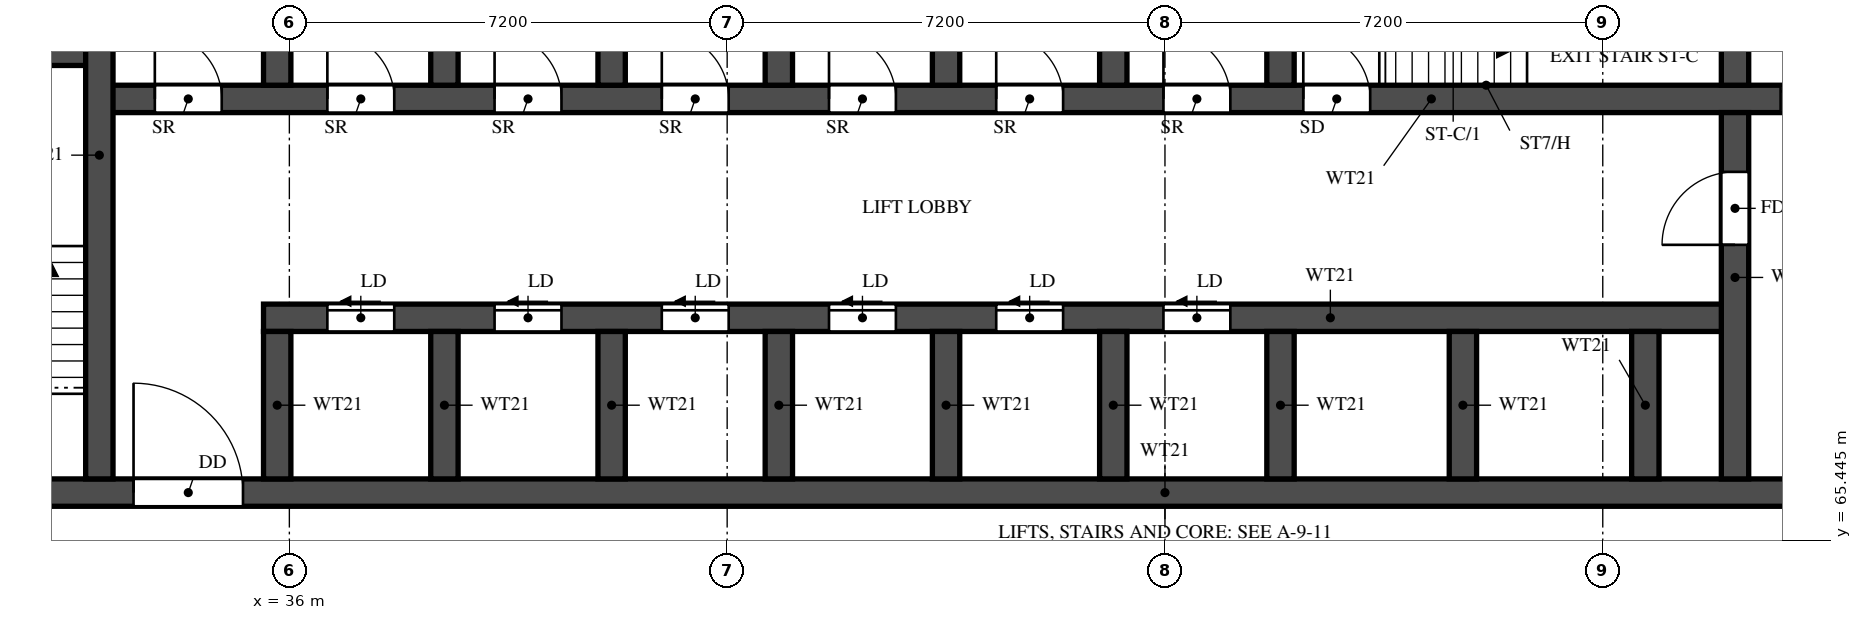
"""IFC4 building model, lengths in metres.
Left out: names, types, materials, properties, quantities, classifications, styles, units other than length and angle.
Written with IfcOpenShell. Run it as: python <this file> out.ifc"""

import sys

from ifc_helpers import new_model, si_unit, direction, frame, frame_2d, origin, place, context, subcontext, project, spatial, rectangle, extrude, element, fill, save


model = new_model("IFC4")
c1 = context("Model", 3, precision=1e-05, world=origin(), true_north=direction((0.0, 1.0)))
c2 = subcontext(c1, "Body", "Model", "MODEL_VIEW")
j1 = project(units=[si_unit("LENGTHUNIT", "METRE"), si_unit("PLANEANGLEUNIT", "RADIAN")], contexts=[c1])
p1 = place(None, origin())
s1 = spatial("IfcSite", under=j1, at=p1, CompositionType="ELEMENT")
p2 = place(p1, origin())
s2 = spatial("IfcBuilding", under=s1, at=p2, CompositionType="ELEMENT")
p3 = place(p2, frame((0.0, 0.0, 65.5)))
s3 = spatial("IfcBuildingStorey", under=s2, at=p3, CompositionType="ELEMENT", Elevation=65.5)
p4 = place(p3, frame((29.7, 66.225, 0.0), z_axis=(0.0, 0.0, 1.0), x_axis=(1.0, 0.0, 0.0)))
e1 = element("IfcWall", 1, at=p4, inside=s3, PredefinedType="SHEAR", context=c2, shape_type="SweptSolid", body=[
    extrude(rectangle(XDim=41.4, YDim=0.45, at=frame_2d((20.7, 0.0))), origin(), (0.0, 0.0, 1.0), 3.18),
])
p5 = place(p4, frame((0.925, 0.0, 0.0)))
e2 = element("IfcOpeningElement", 2, at=p5, cuts=e1, PredefinedType="OPENING", context=c2, shape_type="SweptSolid", body=[
    extrude(rectangle(XDim=1.1, YDim=2.1, at=frame_2d((0.55, 1.05))), frame((0.0, 0.235, 0.0), z_axis=(0.0, -1.0, 0.0), x_axis=(1.0, 0.0, 0.0)), (0.0, 0.0, 1.0), 0.47),
])
p6 = place(p4, frame((3.738, 0.0, 0.0)))
e3 = element("IfcOpeningElement", 3, at=p6, cuts=e1, PredefinedType="OPENING", context=c2, shape_type="SweptSolid", body=[
    extrude(rectangle(XDim=1.8, YDim=2.1, at=frame_2d((0.9, 1.05))), frame((0.0, 0.235, 0.0), z_axis=(0.0, -1.0, 0.0), x_axis=(1.0, 0.0, 0.0)), (0.0, 0.0, 1.0), 0.47),
])
p7 = place(p3, frame((35.575, 69.1, 0.0), z_axis=(0.0, 0.0, 1.0), x_axis=(1.0, 0.0, 0.0)))
e4 = element("IfcWall", 4, at=p7, inside=s3, PredefinedType="SHEAR", context=c2, shape_type="SweptSolid", body=[
    extrude(rectangle(XDim=24.2, YDim=0.45, at=frame_2d((12.1, 0.0))), origin(), (0.0, 0.0, 1.0), 3.18),
])
p8 = place(p7, frame((1.05, 0.0, 0.0)))
e5 = element("IfcOpeningElement", 5, at=p8, cuts=e4, PredefinedType="OPENING", context=c2, shape_type="SweptSolid", body=[
    extrude(rectangle(XDim=1.1, YDim=2.1, at=frame_2d((0.55, 1.05))), frame((0.0, 0.235, 0.0), z_axis=(0.0, -1.0, 0.0), x_axis=(1.0, 0.0, 0.0)), (0.0, 0.0, 1.0), 0.47),
])
p9 = place(p7, frame((3.8, 0.0, 0.0)))
e6 = element("IfcOpeningElement", 6, at=p9, cuts=e4, PredefinedType="OPENING", context=c2, shape_type="SweptSolid", body=[
    extrude(rectangle(XDim=1.1, YDim=2.1, at=frame_2d((0.55, 1.05))), frame((0.0, 0.235, 0.0), z_axis=(0.0, -1.0, 0.0), x_axis=(1.0, 0.0, 0.0)), (0.0, 0.0, 1.0), 0.47),
])
p10 = place(p7, frame((6.55, 0.0, 0.0)))
e7 = element("IfcOpeningElement", 7, at=p10, cuts=e4, PredefinedType="OPENING", context=c2, shape_type="SweptSolid", body=[
    extrude(rectangle(XDim=1.1, YDim=2.1, at=frame_2d((0.55, 1.05))), frame((0.0, 0.235, 0.0), z_axis=(0.0, -1.0, 0.0), x_axis=(1.0, 0.0, 0.0)), (0.0, 0.0, 1.0), 0.47),
])
p11 = place(p7, frame((9.3, 0.0, 0.0)))
e8 = element("IfcOpeningElement", 8, at=p11, cuts=e4, PredefinedType="OPENING", context=c2, shape_type="SweptSolid", body=[
    extrude(rectangle(XDim=1.1, YDim=2.1, at=frame_2d((0.55, 1.05))), frame((0.0, 0.235, 0.0), z_axis=(0.0, -1.0, 0.0), x_axis=(1.0, 0.0, 0.0)), (0.0, 0.0, 1.0), 0.47),
])
p12 = place(p7, frame((12.05, 0.0, 0.0)))
e9 = element("IfcOpeningElement", 9, at=p12, cuts=e4, PredefinedType="OPENING", context=c2, shape_type="SweptSolid", body=[
    extrude(rectangle(XDim=1.1, YDim=2.1, at=frame_2d((0.55, 1.05))), frame((0.0, 0.235, 0.0), z_axis=(0.0, -1.0, 0.0), x_axis=(1.0, 0.0, 0.0)), (0.0, 0.0, 1.0), 0.47),
])
p13 = place(p7, frame((14.8, 0.0, 0.0)))
e10 = element("IfcOpeningElement", 10, at=p13, cuts=e4, PredefinedType="OPENING", context=c2, shape_type="SweptSolid", body=[
    extrude(rectangle(XDim=1.1, YDim=2.1, at=frame_2d((0.55, 1.05))), frame((0.0, 0.235, 0.0), z_axis=(0.0, -1.0, 0.0), x_axis=(1.0, 0.0, 0.0)), (0.0, 0.0, 1.0), 0.47),
])
p14 = place(p3, frame((32.875, 72.7, 0.0), z_axis=(0.0, 0.0, 1.0), x_axis=(1.0, 0.0, 0.0)))
e11 = element("IfcWall", 11, at=p14, inside=s3, PredefinedType="SHEAR", context=c2, shape_type="SweptSolid", body=[
    extrude(rectangle(XDim=35.05, YDim=0.45, at=frame_2d((17.525, 0.0))), origin(), (0.0, 0.0, 1.0), 3.18),
])
p15 = place(p14, frame((19.8, 0.0, 0.0)))
e12 = element("IfcOpeningElement", 12, at=p15, cuts=e11, PredefinedType="OPENING", context=c2, shape_type="SweptSolid", body=[
    extrude(rectangle(XDim=1.1, YDim=2.1, at=frame_2d((0.55, 1.05))), frame((0.0, 0.235, 0.0), z_axis=(0.0, -1.0, 0.0), x_axis=(1.0, 0.0, 0.0)), (0.0, 0.0, 1.0), 0.47),
])
p16 = place(p14, frame((27.65, 0.0, 0.0)))
e13 = element("IfcOpeningElement", 13, at=p16, cuts=e11, PredefinedType="OPENING", context=c2, shape_type="SweptSolid", body=[
    extrude(rectangle(XDim=1.1, YDim=2.1, at=frame_2d((0.55, 1.05))), frame((0.0, 0.235, 0.0), z_axis=(0.0, -1.0, 0.0), x_axis=(1.0, 0.0, 0.0)), (0.0, 0.0, 1.0), 0.47),
])
p17 = place(p14, frame((30.25, 0.0, 0.0)))
e14 = element("IfcOpeningElement", 14, at=p17, cuts=e11, PredefinedType="OPENING", context=c2, shape_type="SweptSolid", body=[
    extrude(rectangle(XDim=1.1, YDim=2.1, at=frame_2d((0.55, 1.05))), frame((0.0, 0.235, 0.0), z_axis=(0.0, -1.0, 0.0), x_axis=(1.0, 0.0, 0.0)), (0.0, 0.0, 1.0), 0.47),
])
p18 = place(p14, frame((3.75, 0.0, 0.0)))
e15 = element("IfcOpeningElement", 15, at=p18, cuts=e11, PredefinedType="OPENING", context=c2, shape_type="SweptSolid", body=[
    extrude(rectangle(XDim=1.1, YDim=2.1, at=frame_2d((0.55, 1.05))), frame((0.0, 0.235, 0.0), z_axis=(0.0, -1.0, 0.0), x_axis=(1.0, 0.0, 0.0)), (0.0, 0.0, 1.0), 0.47),
])
p19 = place(p14, frame((6.5, 0.0, 0.0)))
e16 = element("IfcOpeningElement", 16, at=p19, cuts=e11, PredefinedType="OPENING", context=c2, shape_type="SweptSolid", body=[
    extrude(rectangle(XDim=1.1, YDim=2.1, at=frame_2d((0.55, 1.05))), frame((0.0, 0.235, 0.0), z_axis=(0.0, -1.0, 0.0), x_axis=(1.0, 0.0, 0.0)), (0.0, 0.0, 1.0), 0.47),
])
p20 = place(p14, frame((9.25, 0.0, 0.0)))
e17 = element("IfcOpeningElement", 17, at=p20, cuts=e11, PredefinedType="OPENING", context=c2, shape_type="SweptSolid", body=[
    extrude(rectangle(XDim=1.1, YDim=2.1, at=frame_2d((0.55, 1.05))), frame((0.0, 0.235, 0.0), z_axis=(0.0, -1.0, 0.0), x_axis=(1.0, 0.0, 0.0)), (0.0, 0.0, 1.0), 0.47),
])
p21 = place(p14, frame((12.0, 0.0, 0.0)))
e18 = element("IfcOpeningElement", 18, at=p21, cuts=e11, PredefinedType="OPENING", context=c2, shape_type="SweptSolid", body=[
    extrude(rectangle(XDim=1.1, YDim=2.1, at=frame_2d((0.55, 1.05))), frame((0.0, 0.235, 0.0), z_axis=(0.0, -1.0, 0.0), x_axis=(1.0, 0.0, 0.0)), (0.0, 0.0, 1.0), 0.47),
])
p22 = place(p14, frame((14.75, 0.0, 0.0)))
e19 = element("IfcOpeningElement", 19, at=p22, cuts=e11, PredefinedType="OPENING", context=c2, shape_type="SweptSolid", body=[
    extrude(rectangle(XDim=1.1, YDim=2.1, at=frame_2d((0.55, 1.05))), frame((0.0, 0.235, 0.0), z_axis=(0.0, -1.0, 0.0), x_axis=(1.0, 0.0, 0.0)), (0.0, 0.0, 1.0), 0.47),
])
p23 = place(p14, frame((17.5, 0.0, 0.0)))
e20 = element("IfcOpeningElement", 20, at=p23, cuts=e11, PredefinedType="OPENING", context=c2, shape_type="SweptSolid", body=[
    extrude(rectangle(XDim=1.1, YDim=2.1, at=frame_2d((0.55, 1.05))), frame((0.0, 0.235, 0.0), z_axis=(0.0, -1.0, 0.0), x_axis=(1.0, 0.0, 0.0)), (0.0, 0.0, 1.0), 0.47),
])
p24 = place(p14, frame((0.913, 0.0, 0.0)))
e21 = element("IfcOpeningElement", 21, at=p24, cuts=e11, PredefinedType="OPENING", context=c2, shape_type="SweptSolid", body=[
    extrude(rectangle(XDim=1.1, YDim=2.1, at=frame_2d((0.55, 1.05))), frame((0.0, 0.235, 0.0), z_axis=(0.0, -1.0, 0.0), x_axis=(1.0, 0.0, 0.0)), (0.0, 0.0, 1.0), 0.47),
])
p25 = place(p3, frame((29.7, 73.475, 0.0), z_axis=(0.0, 0.0, 1.0), x_axis=(1.0, 0.0, 0.0)))
e22 = element("IfcWall", 22, at=p25, inside=s3, PredefinedType="SHEAR", context=c2, shape_type="SweptSolid", body=[
    extrude(rectangle(XDim=3.175, YDim=0.45, at=frame_2d((1.587, 0.0))), origin(), (0.0, 0.0, 1.0), 3.18),
])
p26 = place(p3, frame((32.875, 66.45, 0.0), z_axis=(0.0, 0.0, 1.0), x_axis=(0.0, 1.0, 0.0)))
e23 = element("IfcWall", 23, at=p26, inside=s3, PredefinedType="SHEAR", context=c2, shape_type="SweptSolid", body=[
    extrude(rectangle(XDim=10.65, YDim=0.45, at=frame_2d((5.325, 0.0))), origin(), (0.0, 0.0, 1.0), 3.18),
])
p27 = place(p3, frame((59.775, 66.45, 0.0), z_axis=(0.0, 0.0, 1.0), x_axis=(0.0, 1.0, 0.0)))
e24 = element("IfcWall", 24, at=p27, inside=s3, PredefinedType="SHEAR", context=c2, shape_type="SweptSolid", body=[
    extrude(rectangle(XDim=6.025, YDim=0.45, at=frame_2d((3.013, 0.0))), origin(), (0.0, 0.0, 1.0), 3.18),
])
p28 = place(p27, frame((3.85, 0.0, 0.0)))
e25 = element("IfcOpeningElement", 25, at=p28, cuts=e24, PredefinedType="OPENING", context=c2, shape_type="SweptSolid", body=[
    extrude(rectangle(XDim=1.2, YDim=2.1, at=frame_2d((0.6, 1.05))), frame((0.0, 0.235, 0.0), z_axis=(0.0, -1.0, 0.0), x_axis=(1.0, 0.0, 0.0)), (0.0, 0.0, 1.0), 0.47),
])
p29 = place(p3, frame((59.775, 72.925, 0.0), z_axis=(0.0, 0.0, 1.0), x_axis=(0.0, 1.0, 0.0)))
e26 = element("IfcWall", 26, at=p29, inside=s3, PredefinedType="SHEAR", context=c2, shape_type="SweptSolid", body=[
    extrude(rectangle(XDim=2.95, YDim=0.45, at=frame_2d((1.475, 0.0))), origin(), (0.0, 0.0, 1.0), 3.18),
])
for number, where, z_axis, x_axis in (
    (27, (35.8, 66.45, 0.0), (0.0, 0.0, 1.0), (0.0, 1.0, 0.0)),
    (28, (38.55, 66.45, 0.0), (0.0, 0.0, 1.0), (0.0, 1.0, 0.0)),
    (29, (41.3, 66.45, 0.0), (0.0, 0.0, 1.0), (0.0, 1.0, 0.0)),
    (30, (44.05, 66.45, 0.0), (0.0, 0.0, 1.0), (0.0, 1.0, 0.0)),
    (31, (46.8, 66.45, 0.0), (0.0, 0.0, 1.0), (0.0, 1.0, 0.0)),
    (32, (49.55, 66.45, 0.0), (0.0, 0.0, 1.0), (0.0, 1.0, 0.0)),
    (33, (52.3, 66.45, 0.0), (0.0, 0.0, 1.0), (0.0, 1.0, 0.0)),
    (34, (55.3, 66.45, 0.0), (0.0, 0.0, 1.0), (0.0, 1.0, 0.0)),
    (35, (58.3, 66.45, 0.0), (0.0, 0.0, 1.0), (0.0, 1.0, 0.0)),
):
    element("IfcWall", number, at=place(p3, frame(where, z_axis=z_axis, x_axis=x_axis)), inside=s3, PredefinedType="SHEAR", context=c2, shape_type="SweptSolid", body=[
        extrude(rectangle(XDim=2.425, YDim=0.45, at=frame_2d((1.212, 0.0))), origin(), (0.0, 0.0, 1.0), 3.18),
    ])
for number, where, z_axis, x_axis in (
    (36, (35.8, 72.925, 0.0), (0.0, 0.0, 1.0), (0.0, 1.0, 0.0)),
    (37, (38.55, 72.925, 0.0), (0.0, 0.0, 1.0), (0.0, 1.0, 0.0)),
    (38, (41.3, 72.925, 0.0), (0.0, 0.0, 1.0), (0.0, 1.0, 0.0)),
    (39, (44.05, 72.925, 0.0), (0.0, 0.0, 1.0), (0.0, 1.0, 0.0)),
    (40, (46.8, 72.925, 0.0), (0.0, 0.0, 1.0), (0.0, 1.0, 0.0)),
    (41, (49.55, 72.925, 0.0), (0.0, 0.0, 1.0), (0.0, 1.0, 0.0)),
    (42, (52.3, 72.925, 0.0), (0.0, 0.0, 1.0), (0.0, 1.0, 0.0)),
):
    element("IfcWall", number, at=place(p3, frame(where, z_axis=z_axis, x_axis=x_axis)), inside=s3, PredefinedType="SHEAR", context=c2, shape_type="SweptSolid", body=[
        extrude(rectangle(XDim=2.95, YDim=0.45, at=frame_2d((1.475, 0.0))), origin(), (0.0, 0.0, 1.0), 3.18),
    ])
p30 = place(p15, origin())
e43 = element("IfcDoor", 43, at=p30, inside=s3, OperationType="SINGLE_SWING_LEFT", PredefinedType="DOOR", context=c2, shape_type="SweptSolid", body=[
    extrude(rectangle(XDim=1.1, YDim=2.1, at=frame_2d((0.55, 1.05))), frame((0.0, 0.025, 0.0), z_axis=(0.0, -1.0, 0.0), x_axis=(1.0, 0.0, 0.0)), (0.0, 0.0, 1.0), 0.05),
])
fill(e12, e43)
p31 = place(p6, origin())
e44 = element("IfcDoor", 44, at=p31, inside=s3, OperationType="DOUBLE_DOOR_SINGLE_SWING", PredefinedType="DOOR", context=c2, shape_type="SweptSolid", body=[
    extrude(rectangle(XDim=1.8, YDim=2.1, at=frame_2d((0.9, 1.05))), frame((0.0, 0.025, 0.0), z_axis=(0.0, -1.0, 0.0), x_axis=(1.0, 0.0, 0.0)), (0.0, 0.0, 1.0), 0.05),
])
fill(e3, e44)
p32 = place(p28, origin())
e45 = element("IfcDoor", 45, at=p32, inside=s3, OperationType="SINGLE_SWING_RIGHT", PredefinedType="DOOR", context=c2, shape_type="SweptSolid", body=[
    extrude(rectangle(XDim=1.2, YDim=2.1, at=frame_2d((0.6, 1.05))), frame((0.0, 0.025, 0.0), z_axis=(0.0, -1.0, 0.0), x_axis=(1.0, 0.0, 0.0)), (0.0, 0.0, 1.0), 0.05),
])
fill(e25, e45)
p33 = place(p16, origin())
e46 = element("IfcDoor", 46, at=p33, inside=s3, OperationType="SLIDING_TO_LEFT", PredefinedType="DOOR", context=c2, shape_type="SweptSolid", body=[
    extrude(rectangle(XDim=1.1, YDim=2.1, at=frame_2d((0.55, 1.05))), frame((0.0, 0.025, 0.0), z_axis=(0.0, -1.0, 0.0), x_axis=(1.0, 0.0, 0.0)), (0.0, 0.0, 1.0), 0.05),
])
fill(e13, e46)
p34 = place(p8, origin())
e47 = element("IfcDoor", 47, at=p34, inside=s3, OperationType="SLIDING_TO_LEFT", PredefinedType="DOOR", context=c2, shape_type="SweptSolid", body=[
    extrude(rectangle(XDim=1.1, YDim=2.1, at=frame_2d((0.55, 1.05))), frame((0.0, 0.025, 0.0), z_axis=(0.0, -1.0, 0.0), x_axis=(1.0, 0.0, 0.0)), (0.0, 0.0, 1.0), 0.05),
])
fill(e5, e47)
p35 = place(p9, origin())
e48 = element("IfcDoor", 48, at=p35, inside=s3, OperationType="SLIDING_TO_LEFT", PredefinedType="DOOR", context=c2, shape_type="SweptSolid", body=[
    extrude(rectangle(XDim=1.1, YDim=2.1, at=frame_2d((0.55, 1.05))), frame((0.0, 0.025, 0.0), z_axis=(0.0, -1.0, 0.0), x_axis=(1.0, 0.0, 0.0)), (0.0, 0.0, 1.0), 0.05),
])
fill(e6, e48)
p36 = place(p10, origin())
e49 = element("IfcDoor", 49, at=p36, inside=s3, OperationType="SLIDING_TO_LEFT", PredefinedType="DOOR", context=c2, shape_type="SweptSolid", body=[
    extrude(rectangle(XDim=1.1, YDim=2.1, at=frame_2d((0.55, 1.05))), frame((0.0, 0.025, 0.0), z_axis=(0.0, -1.0, 0.0), x_axis=(1.0, 0.0, 0.0)), (0.0, 0.0, 1.0), 0.05),
])
fill(e7, e49)
p37 = place(p11, origin())
e50 = element("IfcDoor", 50, at=p37, inside=s3, OperationType="SLIDING_TO_LEFT", PredefinedType="DOOR", context=c2, shape_type="SweptSolid", body=[
    extrude(rectangle(XDim=1.1, YDim=2.1, at=frame_2d((0.55, 1.05))), frame((0.0, 0.025, 0.0), z_axis=(0.0, -1.0, 0.0), x_axis=(1.0, 0.0, 0.0)), (0.0, 0.0, 1.0), 0.05),
])
fill(e8, e50)
p38 = place(p12, origin())
e51 = element("IfcDoor", 51, at=p38, inside=s3, OperationType="SLIDING_TO_LEFT", PredefinedType="DOOR", context=c2, shape_type="SweptSolid", body=[
    extrude(rectangle(XDim=1.1, YDim=2.1, at=frame_2d((0.55, 1.05))), frame((0.0, 0.025, 0.0), z_axis=(0.0, -1.0, 0.0), x_axis=(1.0, 0.0, 0.0)), (0.0, 0.0, 1.0), 0.05),
])
fill(e9, e51)
p39 = place(p13, origin())
e52 = element("IfcDoor", 52, at=p39, inside=s3, OperationType="SLIDING_TO_LEFT", PredefinedType="DOOR", context=c2, shape_type="SweptSolid", body=[
    extrude(rectangle(XDim=1.1, YDim=2.1, at=frame_2d((0.55, 1.05))), frame((0.0, 0.025, 0.0), z_axis=(0.0, -1.0, 0.0), x_axis=(1.0, 0.0, 0.0)), (0.0, 0.0, 1.0), 0.05),
])
fill(e10, e52)
p40 = place(p18, origin())
e53 = element("IfcDoor", 53, at=p40, inside=s3, OperationType="SINGLE_SWING_LEFT", PredefinedType="DOOR", context=c2, shape_type="SweptSolid", body=[
    extrude(rectangle(XDim=1.1, YDim=2.1, at=frame_2d((0.55, 1.05))), frame((0.0, 0.025, 0.0), z_axis=(0.0, -1.0, 0.0), x_axis=(1.0, 0.0, 0.0)), (0.0, 0.0, 1.0), 0.05),
])
fill(e15, e53)
p41 = place(p19, origin())
e54 = element("IfcDoor", 54, at=p41, inside=s3, OperationType="SINGLE_SWING_LEFT", PredefinedType="DOOR", context=c2, shape_type="SweptSolid", body=[
    extrude(rectangle(XDim=1.1, YDim=2.1, at=frame_2d((0.55, 1.05))), frame((0.0, 0.025, 0.0), z_axis=(0.0, -1.0, 0.0), x_axis=(1.0, 0.0, 0.0)), (0.0, 0.0, 1.0), 0.05),
])
fill(e16, e54)
p42 = place(p20, origin())
e55 = element("IfcDoor", 55, at=p42, inside=s3, OperationType="SINGLE_SWING_LEFT", PredefinedType="DOOR", context=c2, shape_type="SweptSolid", body=[
    extrude(rectangle(XDim=1.1, YDim=2.1, at=frame_2d((0.55, 1.05))), frame((0.0, 0.025, 0.0), z_axis=(0.0, -1.0, 0.0), x_axis=(1.0, 0.0, 0.0)), (0.0, 0.0, 1.0), 0.05),
])
fill(e17, e55)
p43 = place(p21, origin())
e56 = element("IfcDoor", 56, at=p43, inside=s3, OperationType="SINGLE_SWING_LEFT", PredefinedType="DOOR", context=c2, shape_type="SweptSolid", body=[
    extrude(rectangle(XDim=1.1, YDim=2.1, at=frame_2d((0.55, 1.05))), frame((0.0, 0.025, 0.0), z_axis=(0.0, -1.0, 0.0), x_axis=(1.0, 0.0, 0.0)), (0.0, 0.0, 1.0), 0.05),
])
fill(e18, e56)
p44 = place(p22, origin())
e57 = element("IfcDoor", 57, at=p44, inside=s3, OperationType="SINGLE_SWING_LEFT", PredefinedType="DOOR", context=c2, shape_type="SweptSolid", body=[
    extrude(rectangle(XDim=1.1, YDim=2.1, at=frame_2d((0.55, 1.05))), frame((0.0, 0.025, 0.0), z_axis=(0.0, -1.0, 0.0), x_axis=(1.0, 0.0, 0.0)), (0.0, 0.0, 1.0), 0.05),
])
fill(e19, e57)
p45 = place(p23, origin())
e58 = element("IfcDoor", 58, at=p45, inside=s3, OperationType="SINGLE_SWING_LEFT", PredefinedType="DOOR", context=c2, shape_type="SweptSolid", body=[
    extrude(rectangle(XDim=1.1, YDim=2.1, at=frame_2d((0.55, 1.05))), frame((0.0, 0.025, 0.0), z_axis=(0.0, -1.0, 0.0), x_axis=(1.0, 0.0, 0.0)), (0.0, 0.0, 1.0), 0.05),
])
fill(e20, e58)
p46 = place(p24, origin())
e59 = element("IfcDoor", 59, at=p46, inside=s3, OperationType="SINGLE_SWING_LEFT", PredefinedType="DOOR", context=c2, shape_type="SweptSolid", body=[
    extrude(rectangle(XDim=1.1, YDim=2.1, at=frame_2d((0.55, 1.05))), frame((0.0, 0.025, 0.0), z_axis=(0.0, -1.0, 0.0), x_axis=(1.0, 0.0, 0.0)), (0.0, 0.0, 1.0), 0.05),
])
fill(e21, e59)
save(model, sys.argv[1])
